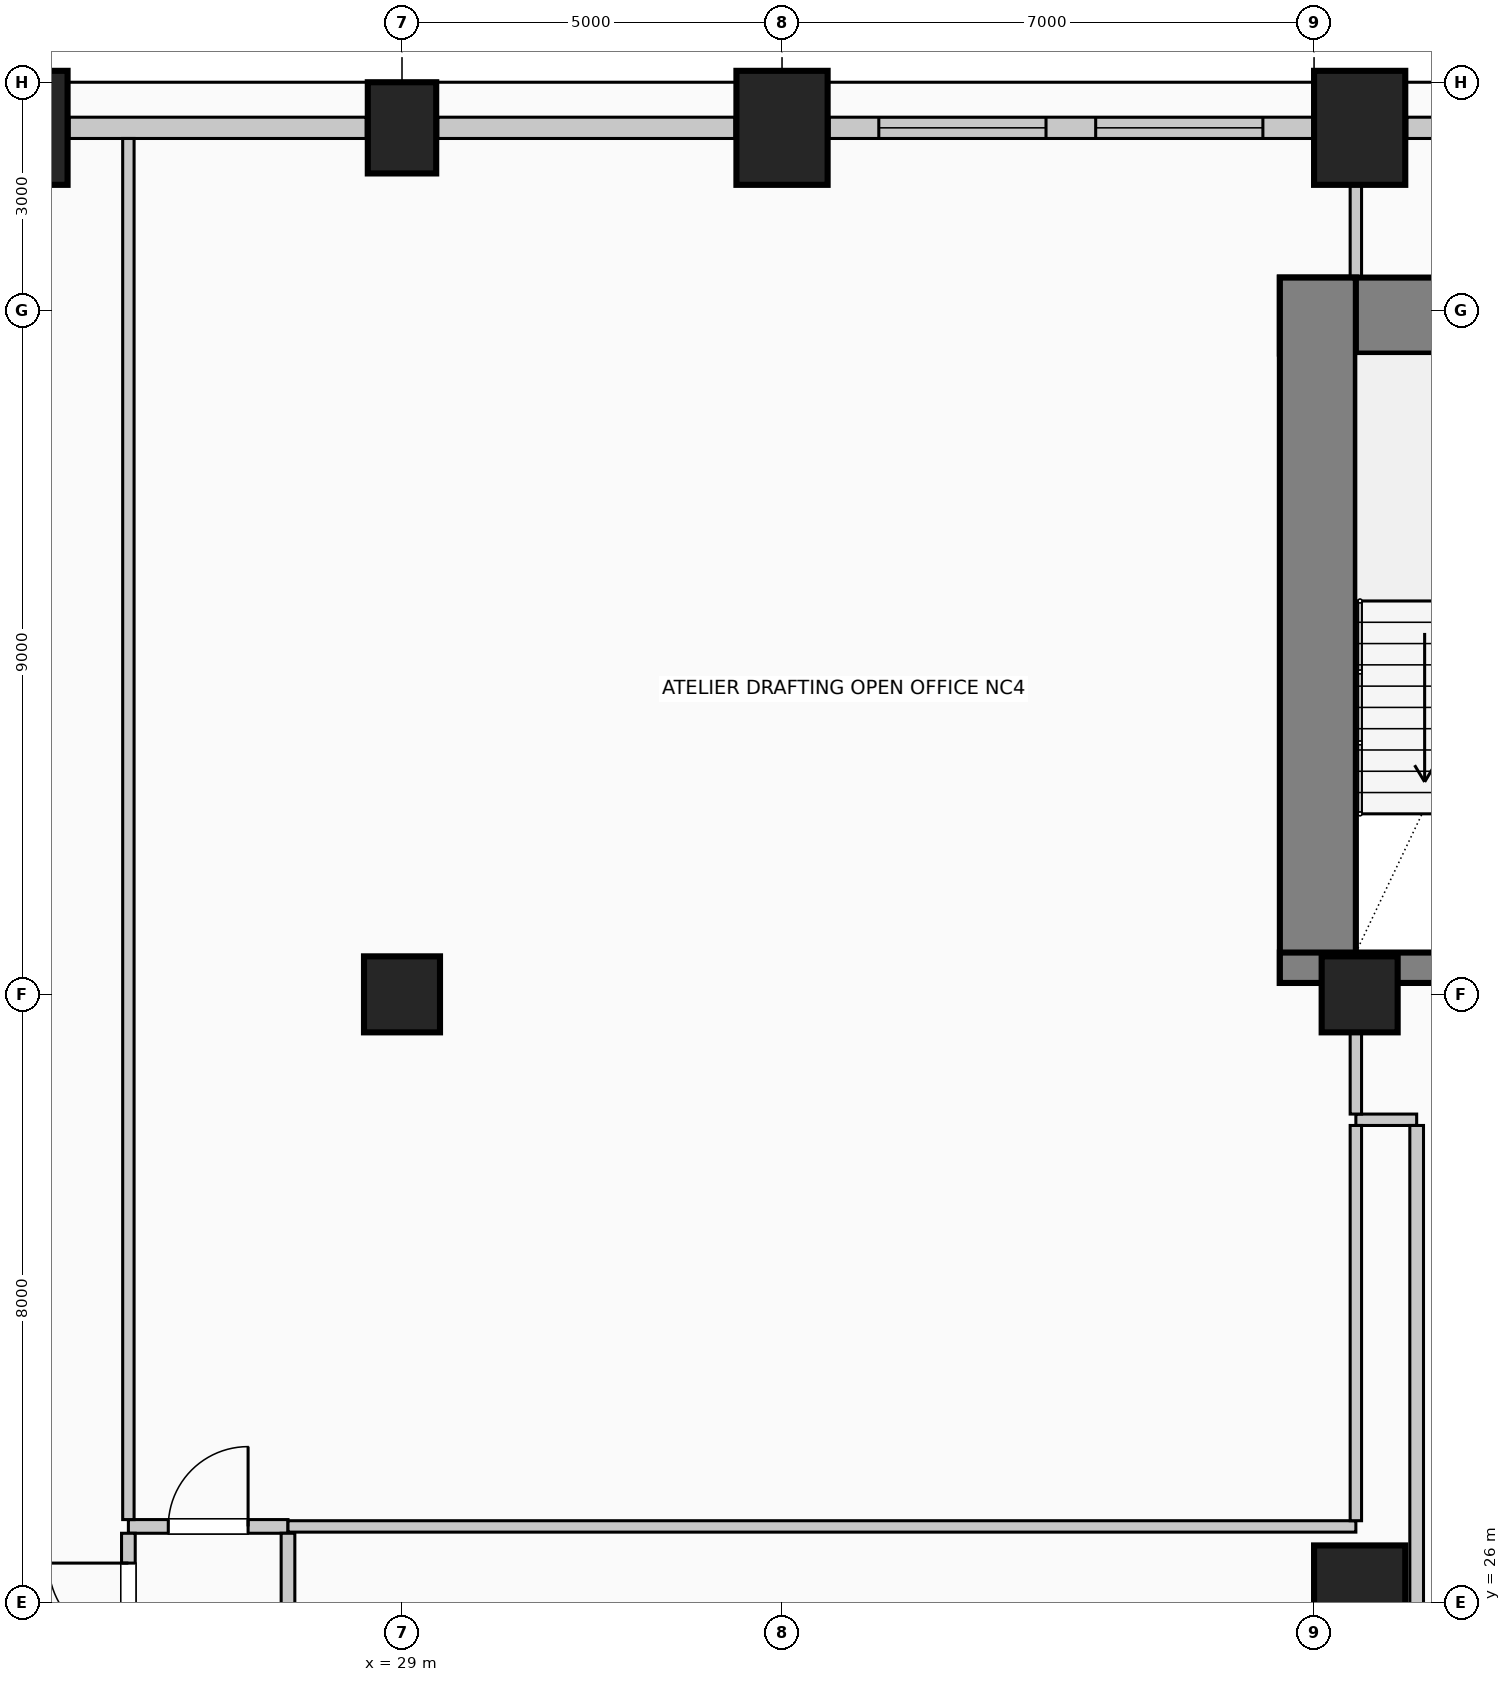
"""IFC4 building model, lengths in metres.
Left out: names, types, materials, properties, quantities, classifications, styles, units other than length and angle.
Written with IfcOpenShell. Run it as: python <this file> out.ifc"""

import sys

from ifc_helpers import new_model, si_unit, direction, frame, frame_2d, origin, origin_2d, place, context, subcontext, project, spatial, rectangle, circle, extrude, element, fill, save


model = new_model("IFC4")
c1 = context("Model", 3, precision=1e-05, world=origin(), true_north=direction((0.0, 1.0)))
c2 = subcontext(c1, "Body", "Model", "MODEL_VIEW")
j1 = project(units=[si_unit("LENGTHUNIT", "METRE"), si_unit("PLANEANGLEUNIT", "RADIAN")], contexts=[c1])
p1 = place(None, origin())
s1 = spatial("IfcSite", under=j1, at=p1, CompositionType="ELEMENT")
p2 = place(p1, origin())
s2 = spatial("IfcBuilding", under=s1, at=p2, CompositionType="ELEMENT")
p3 = place(p2, frame((0.0, 0.0, 58.6)))
s3 = spatial("IfcBuildingStorey", under=s2, at=p3, CompositionType="ELEMENT", Elevation=58.6)
p4 = place(p3, frame((40.55, 42.93, 0.0), z_axis=(0.0, 0.0, 1.0), x_axis=(1.0, 0.0, 0.0)))
e1 = element("IfcWall", 1, at=p4, inside=s3, PredefinedType="SHEAR", context=c2, shape_type="SweptSolid", body=[
    extrude(rectangle(XDim=14.9, YDim=1.0, at=frame_2d((7.45, 0.0))), origin(), (0.0, 0.0, 1.0), 4.0),
])
p5 = place(p3, frame((41.05, 34.15, 0.0), z_axis=(0.0, 0.0, 1.0), x_axis=(0.0, 1.0, 0.0)))
e2 = element("IfcWall", 2, at=p5, inside=s3, PredefinedType="SHEAR", context=c2, shape_type="SweptSolid", body=[
    extrude(rectangle(XDim=9.28, YDim=1.0, at=frame_2d((4.64, 0.0))), origin(), (0.0, 0.0, 1.0), 4.0),
])
p6 = place(p3, frame((40.55, 34.35, 0.0), z_axis=(0.0, 0.0, 1.0), x_axis=(1.0, 0.0, 0.0)))
e3 = element("IfcWall", 3, at=p6, inside=s3, PredefinedType="SHEAR", context=c2, shape_type="SweptSolid", body=[
    extrude(rectangle(XDim=5.16, YDim=0.4, at=frame_2d((2.58, 0.0))), origin(), (0.0, 0.0, 1.0), 4.0),
])
p7 = place(p6, frame((2.4, 0.0, 0.0)))
e4 = element("IfcOpeningElement", 4, at=p7, cuts=e3, PredefinedType="OPENING", context=c2, shape_type="SweptSolid", body=[
    extrude(rectangle(XDim=1.15, YDim=2.2, at=frame_2d((0.575, 1.1))), frame((0.0, 0.21, 0.0), z_axis=(0.0, -1.0, 0.0), x_axis=(1.0, 0.0, 0.0)), (0.0, 0.0, 1.0), 0.42),
])
p8 = place(p3, frame((24.0, 45.4, 0.0), z_axis=(0.0, 0.0, 1.0), x_axis=(1.0, 0.0, 0.0)))
e5 = element("IfcColumn", 5, at=p8, inside=s3, PredefinedType="COLUMN", context=c2, shape_type="SweptSolid", body=[
    extrude(rectangle(XDim=1.2, YDim=1.5, at=origin_2d()), origin(), (0.0, 0.0, 1.0), 4.0),
])
p9 = place(p3, frame((29.0, 45.4, 0.0), z_axis=(0.0, 0.0, 1.0), x_axis=(1.0, 0.0, 0.0)))
e6 = element("IfcColumn", 6, at=p9, inside=s3, PredefinedType="COLUMN", context=c2, shape_type="SweptSolid", body=[
    extrude(rectangle(XDim=0.9, YDim=1.2, at=origin_2d()), origin(), (0.0, 0.0, 1.0), 4.0),
])
for number, where, z_axis, x_axis in (
    (7, (34.0, 45.4, 0.0), (0.0, 0.0, 1.0), (1.0, 0.0, 0.0)),
    (8, (41.6, 45.4, 0.0), (0.0, 0.0, 1.0), (1.0, 0.0, 0.0)),
    (9, (41.6, 26.0, 0.0), (0.0, 0.0, 1.0), (1.0, 0.0, 0.0)),
):
    element("IfcColumn", number, at=place(p3, frame(where, z_axis=z_axis, x_axis=x_axis)), inside=s3, PredefinedType="COLUMN", context=c2, shape_type="SweptSolid", body=[
        extrude(rectangle(XDim=1.2, YDim=1.5, at=origin_2d()), origin(), (0.0, 0.0, 1.0), 4.0),
    ])
for number, where, z_axis, x_axis in (
    (10, (29.0, 34.0, 0.0), (0.0, 0.0, 1.0), (1.0, 0.0, 0.0)),
    (11, (41.6, 34.0, 0.0), (0.0, 0.0, 1.0), (1.0, 0.0, 0.0)),
):
    element("IfcColumn", number, at=place(p3, frame(where, z_axis=z_axis, x_axis=x_axis)), inside=s3, PredefinedType="COLUMN", context=c2, shape_type="SweptSolid", body=[
        extrude(circle(Radius=0.5, at=origin_2d()), origin(), (0.0, 0.0, 1.0), 4.0),
    ])
for number, where, z_axis, x_axis in (
    (12, (24.62, 45.4, 0.0), (0.0, 0.0, 1.0), (1.0, 0.0, 0.0)),
    (13, (29.47, 45.4, 0.0), (0.0, 0.0, 1.0), (1.0, 0.0, 0.0)),
):
    element("IfcWall", number, at=place(p3, frame(where, z_axis=z_axis, x_axis=x_axis)), inside=s3, PredefinedType="SOLIDWALL", context=c2, shape_type="SweptSolid", body=[
        extrude(rectangle(XDim=3.91, YDim=0.28, at=frame_2d((1.955, 0.0))), origin(), (0.0, 0.0, 1.0), 2.85),
    ])
p10 = place(p3, frame((34.62, 45.4, 0.0), z_axis=(0.0, 0.0, 1.0), x_axis=(1.0, 0.0, 0.0)))
e14 = element("IfcWall", 14, at=p10, inside=s3, PredefinedType="SOLIDWALL", context=c2, shape_type="SweptSolid", body=[
    extrude(rectangle(XDim=6.36, YDim=0.28, at=frame_2d((3.18, 0.0))), origin(), (0.0, 0.0, 1.0), 2.85),
])
p11 = place(p10, frame((0.653, 0.0, 0.5)))
e15 = element("IfcOpeningElement", 15, at=p11, cuts=e14, PredefinedType="OPENING", context=c2, shape_type="SweptSolid", body=[
    extrude(rectangle(XDim=2.2, YDim=1.95, at=frame_2d((1.1, 0.975))), frame((0.0, 0.15, 0.0), z_axis=(0.0, -1.0, 0.0), x_axis=(1.0, 0.0, 0.0)), (0.0, 0.0, 1.0), 0.3),
])
p12 = place(p10, frame((3.507, 0.0, 0.5)))
e16 = element("IfcOpeningElement", 16, at=p12, cuts=e14, PredefinedType="OPENING", context=c2, shape_type="SweptSolid", body=[
    extrude(rectangle(XDim=2.2, YDim=1.95, at=frame_2d((1.1, 0.975))), frame((0.0, 0.15, 0.0), z_axis=(0.0, -1.0, 0.0), x_axis=(1.0, 0.0, 0.0)), (0.0, 0.0, 1.0), 0.3),
])
p13 = place(p3, frame((42.22, 45.4, 0.0), z_axis=(0.0, 0.0, 1.0), x_axis=(1.0, 0.0, 0.0)))
e17 = element("IfcWall", 17, at=p13, inside=s3, PredefinedType="SOLIDWALL", context=c2, shape_type="SweptSolid", body=[
    extrude(rectangle(XDim=1.31, YDim=0.28, at=frame_2d((0.655, 0.0))), origin(), (0.0, 0.0, 1.0), 2.85),
])
p14 = place(p3, frame((25.4, 27.0, 0.0), z_axis=(0.0, 0.0, 1.0), x_axis=(1.0, 0.0, 0.0)))
e18 = element("IfcWall", 18, at=p14, inside=s3, PredefinedType="PARTITIONING", context=c2, shape_type="SweptSolid", body=[
    extrude(rectangle(XDim=2.1, YDim=0.18, at=frame_2d((1.05, 0.0))), origin(), (0.0, 0.0, 1.0), 3.7),
])
p15 = place(p14, frame((0.525, 0.0, 0.0)))
e19 = element("IfcOpeningElement", 19, at=p15, cuts=e18, PredefinedType="OPENING", context=c2, shape_type="SweptSolid", body=[
    extrude(rectangle(XDim=1.05, YDim=2.15, at=frame_2d((0.525, 1.075))), frame((0.0, 0.1, 0.0), z_axis=(0.0, -1.0, 0.0), x_axis=(1.0, 0.0, 0.0)), (0.0, 0.0, 1.0), 0.2),
])
p16 = place(p3, frame((27.5, 27.0, 0.0), z_axis=(0.0, 0.0, 1.0), x_axis=(1.0, 0.0, 0.0)))
e20 = element("IfcWall", 20, at=p16, inside=s3, PredefinedType="PARTITIONING", context=c2, shape_type="SweptSolid", body=[
    extrude(rectangle(XDim=14.05, YDim=0.15, at=frame_2d((7.025, 0.0))), origin(), (0.0, 0.0, 1.0), 3.7),
])
p17 = place(p3, frame((41.55, 32.35, 0.0), z_axis=(0.0, 0.0, 1.0), x_axis=(1.0, 0.0, 0.0)))
e21 = element("IfcWall", 21, at=p17, inside=s3, PredefinedType="PARTITIONING", context=c2, shape_type="SweptSolid", body=[
    extrude(rectangle(XDim=0.8, YDim=0.15, at=frame_2d((0.4, 0.0))), origin(), (0.0, 0.0, 1.0), 3.7),
])
p18 = place(p3, frame((25.4, 25.075, 0.0), z_axis=(0.0, 0.0, 1.0), x_axis=(0.0, 1.0, 0.0)))
e22 = element("IfcWall", 22, at=p18, inside=s3, PredefinedType="PARTITIONING", context=c2, shape_type="SweptSolid", body=[
    extrude(rectangle(XDim=1.835, YDim=0.18, at=frame_2d((0.917, 0.0))), origin(), (0.0, 0.0, 1.0), 3.7),
])
p19 = place(p18, frame((0.393, 0.0, 0.0)))
e23 = element("IfcOpeningElement", 23, at=p19, cuts=e22, PredefinedType="OPENING", context=c2, shape_type="SweptSolid", body=[
    extrude(rectangle(XDim=1.05, YDim=2.15, at=frame_2d((0.525, 1.075))), frame((0.0, 0.1, 0.0), z_axis=(0.0, -1.0, 0.0), x_axis=(1.0, 0.0, 0.0)), (0.0, 0.0, 1.0), 0.2),
])
p20 = place(p3, frame((25.4, 27.09, 0.0), z_axis=(0.0, 0.0, 1.0), x_axis=(0.0, 1.0, 0.0)))
e24 = element("IfcWall", 24, at=p20, inside=s3, PredefinedType="PARTITIONING", context=c2, shape_type="SweptSolid", body=[
    extrude(rectangle(XDim=18.17, YDim=0.15, at=frame_2d((9.085, 0.0))), origin(), (0.0, 0.0, 1.0), 3.7),
])
p21 = place(p3, frame((27.5, 21.19, 0.0), z_axis=(0.0, 0.0, 1.0), x_axis=(0.0, 1.0, 0.0)))
e25 = element("IfcWall", 25, at=p21, inside=s3, PredefinedType="PARTITIONING", context=c2, shape_type="SweptSolid", body=[
    extrude(rectangle(XDim=5.72, YDim=0.18, at=frame_2d((2.86, 0.0))), origin(), (0.0, 0.0, 1.0), 3.7),
])
p22 = place(p3, frame((41.55, 27.075, 0.0), z_axis=(0.0, 0.0, 1.0), x_axis=(0.0, 1.0, 0.0)))
e26 = element("IfcWall", 26, at=p22, inside=s3, PredefinedType="PARTITIONING", context=c2, shape_type="SweptSolid", body=[
    extrude(rectangle(XDim=5.2, YDim=0.15, at=frame_2d((2.6, 0.0))), origin(), (0.0, 0.0, 1.0), 2.995),
])
p23 = place(p3, frame((41.55, 32.425, 0.0), z_axis=(0.0, 0.0, 1.0), x_axis=(0.0, 1.0, 0.0)))
e27 = element("IfcWall", 27, at=p23, inside=s3, PredefinedType="PARTITIONING", context=c2, shape_type="SweptSolid", body=[
    extrude(rectangle(XDim=1.075, YDim=0.15, at=frame_2d((0.538, 0.0))), origin(), (0.0, 0.0, 1.0), 2.995),
])
p24 = place(p3, frame((41.55, 43.43, 0.0), z_axis=(0.0, 0.0, 1.0), x_axis=(0.0, 1.0, 0.0)))
e28 = element("IfcWall", 28, at=p24, inside=s3, PredefinedType="PARTITIONING", context=c2, shape_type="SweptSolid", body=[
    extrude(rectangle(XDim=1.22, YDim=0.15, at=frame_2d((0.61, 0.0))), origin(), (0.0, 0.0, 1.0), 3.7),
])
p25 = place(p3, frame((42.35, 21.19, 0.0), z_axis=(0.0, 0.0, 1.0), x_axis=(0.0, 1.0, 0.0)))
e29 = element("IfcWall", 29, at=p25, inside=s3, PredefinedType="PARTITIONING", context=c2, shape_type="SweptSolid", body=[
    extrude(rectangle(XDim=11.085, YDim=0.18, at=frame_2d((5.542, 0.0))), origin(), (0.0, 0.0, 1.0), 3.7),
])
p26 = place(p11, origin())
e30 = element("IfcWindow", 30, at=p26, inside=s3, PartitioningType="SINGLE_PANEL", PredefinedType="WINDOW", context=c2, shape_type="SweptSolid", body=[
    extrude(rectangle(XDim=2.2, YDim=1.95, at=frame_2d((1.1, 0.975))), frame((0.0, 0.03, 0.0), z_axis=(0.0, -1.0, 0.0), x_axis=(1.0, 0.0, 0.0)), (0.0, 0.0, 1.0), 0.06),
])
fill(e15, e30)
p27 = place(p12, origin())
e31 = element("IfcWindow", 31, at=p27, inside=s3, PartitioningType="SINGLE_PANEL", PredefinedType="WINDOW", context=c2, shape_type="SweptSolid", body=[
    extrude(rectangle(XDim=2.2, YDim=1.95, at=frame_2d((1.1, 0.975))), frame((0.0, 0.03, 0.0), z_axis=(0.0, -1.0, 0.0), x_axis=(1.0, 0.0, 0.0)), (0.0, 0.0, 1.0), 0.06),
])
fill(e16, e31)
p28 = place(p15, origin())
e32 = element("IfcDoor", 32, at=p28, inside=s3, OperationType="SINGLE_SWING_RIGHT", PredefinedType="DOOR", context=c2, shape_type="SweptSolid", body=[
    extrude(rectangle(XDim=1.05, YDim=2.15, at=frame_2d((0.525, 1.075))), frame((0.0, 0.025, 0.0), z_axis=(0.0, -1.0, 0.0), x_axis=(1.0, 0.0, 0.0)), (0.0, 0.0, 1.0), 0.05),
])
fill(e19, e32)
p29 = place(p19, origin())
e33 = element("IfcDoor", 33, at=p29, inside=s3, OperationType="SINGLE_SWING_RIGHT", PredefinedType="DOOR", context=c2, shape_type="SweptSolid", body=[
    extrude(rectangle(XDim=1.05, YDim=2.15, at=frame_2d((0.525, 1.075))), frame((0.0, 0.025, 0.0), z_axis=(0.0, -1.0, 0.0), x_axis=(1.0, 0.0, 0.0)), (0.0, 0.0, 1.0), 0.05),
])
fill(e23, e33)
save(model, sys.argv[1])
